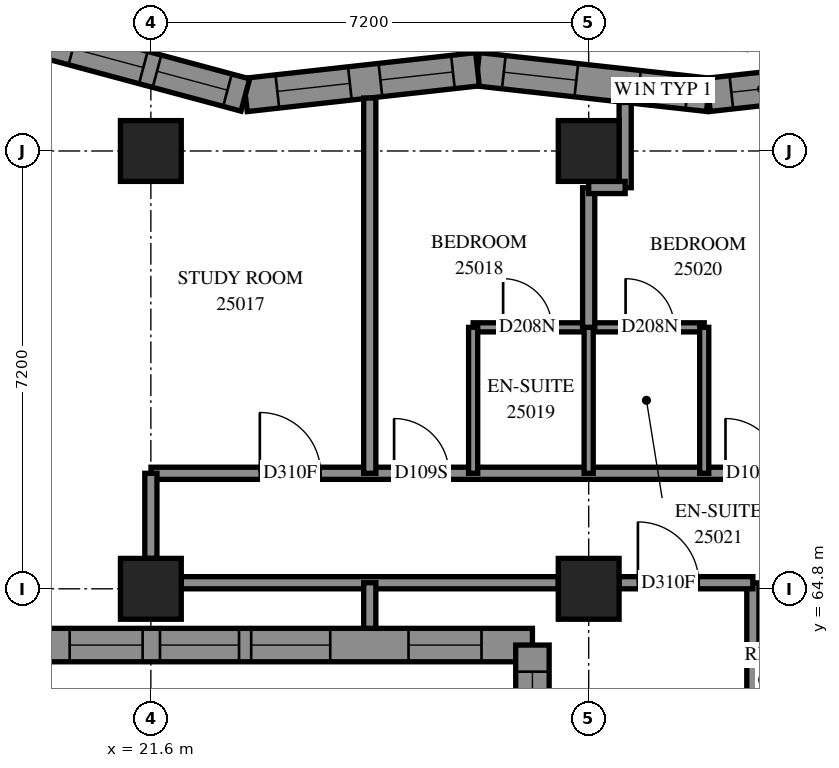
"""IFC4 building model, lengths in metres.
Left out: names, types, materials, properties, quantities, classifications, styles, units other than length and angle.
Written with IfcOpenShell. Run it as: python <this file> out.ifc"""

import sys

from ifc_helpers import new_model, si_unit, direction, frame, frame_2d, origin, origin_2d, place, context, subcontext, project, spatial, polyline, rectangle, outline, extrude, element, fill, save


model = new_model("IFC4")
c1 = context("Model", 3, precision=1e-05, world=origin(), true_north=direction((0.0, 1.0)))
c2 = subcontext(c1, "Body", "Model", "MODEL_VIEW")
j1 = project(units=[si_unit("LENGTHUNIT", "METRE"), si_unit("PLANEANGLEUNIT", "RADIAN")], contexts=[c1])
p1 = place(None, origin())
s1 = spatial("IfcSite", under=j1, at=p1, CompositionType="ELEMENT")
p2 = place(p1, origin())
s2 = spatial("IfcBuilding", under=s1, at=p2, CompositionType="ELEMENT")
p3 = place(p2, frame((0.0, 0.0, 94.8)))
s3 = spatial("IfcBuildingStorey", under=s2, at=p3, CompositionType="ELEMENT", Elevation=94.8)
for number, where, z_axis, x_axis in (
    (1, (21.6, 64.8, 0.0), (0.0, 0.0, 1.0), (1.0, 0.0, 0.0)),
    (2, (21.6, 72.0, 0.0), (0.0, 0.0, 1.0), (1.0, 0.0, 0.0)),
    (3, (28.8, 64.8, 0.0), (0.0, 0.0, 1.0), (1.0, 0.0, 0.0)),
    (4, (28.8, 72.0, 0.0), (0.0, 0.0, 1.0), (1.0, 0.0, 0.0)),
):
    element("IfcColumn", number, at=place(p3, frame(where, z_axis=z_axis, x_axis=x_axis)), inside=s3, PredefinedType="COLUMN", context=c2, shape_type="SweptSolid", body=[
        extrude(rectangle(XDim=1.0, YDim=1.0, at=origin_2d()), origin(), (0.0, 0.0, 1.0), 3.1),
    ])
p4 = place(p3, frame((34.564, 73.344, 0.0), z_axis=(0.0, 0.0, 1.0), x_axis=(-0.993907338, -0.1102188888, 0.0)))
e5 = element("IfcWall", 5, at=p4, inside=s3, PredefinedType="SOLIDWALL", context=c2, shape_type="SweptSolid", body=[
    extrude(outline(polyline([(-0.03, -0.275), (3.789, -0.275), (3.85, 0.275), (0.03, 0.275), (-0.03, -0.275)])), origin(), (0.0, 0.0, 1.0), 3.1),
])
p5 = place(p4, frame((0.604, 0.0, 0.5)))
e6 = element("IfcOpeningElement", 6, at=p5, cuts=e5, PredefinedType="OPENING", context=c2, shape_type="SweptSolid", body=[
    extrude(rectangle(XDim=1.2, YDim=2.45, at=frame_2d((0.6, 1.225))), frame((0.0, 0.285, 0.0), z_axis=(0.0, -1.0, 0.0), x_axis=(1.0, 0.0, 0.0)), (0.0, 0.0, 1.0), 0.57),
])
p6 = place(p4, frame((2.439, 0.0, 0.45)))
e7 = element("IfcOpeningElement", 7, at=p6, cuts=e5, PredefinedType="OPENING", context=c2, shape_type="SweptSolid", body=[
    extrude(rectangle(XDim=1.0, YDim=2.5, at=frame_2d((0.5, 1.25))), frame((0.0, 0.285, 0.0), z_axis=(0.0, -1.0, 0.0), x_axis=(1.0, 0.0, 0.0)), (0.0, 0.0, 1.0), 0.57),
])
p7 = place(p3, frame((30.768, 72.923, 0.0), z_axis=(0.0, 0.0, 1.0), x_axis=(-0.99390702, 0.1102217568, 0.0)))
e8 = element("IfcWall", 8, at=p7, inside=s3, PredefinedType="SOLIDWALL", context=c2, shape_type="SweptSolid", body=[
    extrude(outline(polyline([(0.03, -0.275), (3.85, -0.275), (3.789, 0.275), (-0.03, 0.275), (0.03, -0.275)])), origin(), (0.0, 0.0, 1.0), 3.1),
])
p8 = place(p7, frame((2.184, 0.0, 0.5)))
e9 = element("IfcOpeningElement", 9, at=p8, cuts=e8, PredefinedType="OPENING", context=c2, shape_type="SweptSolid", body=[
    extrude(rectangle(XDim=1.2, YDim=2.45, at=frame_2d((0.6, 1.225))), frame((0.0, 0.285, 0.0), z_axis=(0.0, -1.0, 0.0), x_axis=(1.0, 0.0, 0.0)), (0.0, 0.0, 1.0), 0.57),
])
p9 = place(p7, frame((0.348, 0.0, 0.45)))
e10 = element("IfcOpeningElement", 10, at=p9, cuts=e8, PredefinedType="OPENING", context=c2, shape_type="SweptSolid", body=[
    extrude(rectangle(XDim=0.8, YDim=2.5, at=frame_2d((0.4, 1.25))), frame((0.0, 0.285, 0.0), z_axis=(0.0, -1.0, 0.0), x_axis=(1.0, 0.0, 0.0)), (0.0, 0.0, 1.0), 0.57),
])
p10 = place(p3, frame((26.972, 73.344, 0.0), z_axis=(0.0, 0.0, 1.0), x_axis=(-0.9939087915, -0.1102057815, 0.0)))
e11 = element("IfcWall", 11, at=p10, inside=s3, PredefinedType="SOLIDWALL", context=c2, shape_type="SweptSolid", body=[
    extrude(outline(polyline([(-0.03, -0.275), (3.789, -0.275), (3.893, 0.275), (0.03, 0.275), (-0.03, -0.275)])), origin(), (0.0, 0.0, 1.0), 3.1),
])
p11 = place(p10, frame((0.406, 0.0, 0.5)))
e12 = element("IfcOpeningElement", 12, at=p11, cuts=e11, PredefinedType="OPENING", context=c2, shape_type="SweptSolid", body=[
    extrude(rectangle(XDim=1.2, YDim=2.45, at=frame_2d((0.6, 1.225))), frame((0.0, 0.285, 0.0), z_axis=(0.0, -1.0, 0.0), x_axis=(1.0, 0.0, 0.0)), (0.0, 0.0, 1.0), 0.57),
])
p12 = place(p10, frame((2.112, 0.0, 0.5)))
e13 = element("IfcOpeningElement", 13, at=p12, cuts=e11, PredefinedType="OPENING", context=c2, shape_type="SweptSolid", body=[
    extrude(rectangle(XDim=1.2, YDim=2.45, at=frame_2d((0.6, 1.225))), frame((0.0, 0.285, 0.0), z_axis=(0.0, -1.0, 0.0), x_axis=(1.0, 0.0, 0.0)), (0.0, 0.0, 1.0), 0.57),
])
p13 = place(p3, frame((23.154, 72.921, 0.0), z_axis=(0.0, 0.0, 1.0), x_axis=(-0.9656855195, 0.2597142227, 0.0)))
e14 = element("IfcWall", 14, at=p13, inside=s3, PredefinedType="SOLIDWALL", context=c2, shape_type="SweptSolid", body=[
    extrude(outline(polyline([(0.052, -0.275), (3.983, -0.275), (3.266, 0.275), (-0.052, 0.275), (0.052, -0.275)])), origin(), (0.0, 0.0, 1.0), 3.1),
])
p14 = place(p13, frame((0.305, 0.0, 0.5)))
e15 = element("IfcOpeningElement", 15, at=p14, cuts=e14, PredefinedType="OPENING", context=c2, shape_type="SweptSolid", body=[
    extrude(rectangle(XDim=1.2, YDim=2.45, at=frame_2d((0.6, 1.225))), frame((0.0, 0.285, 0.0), z_axis=(0.0, -1.0, 0.0), x_axis=(1.0, 0.0, 0.0)), (0.0, 0.0, 1.0), 0.57),
])
p15 = place(p13, frame((1.738, 0.0, 0.5)))
e16 = element("IfcOpeningElement", 16, at=p15, cuts=e14, PredefinedType="OPENING", context=c2, shape_type="SweptSolid", body=[
    extrude(rectangle(XDim=1.2, YDim=2.45, at=frame_2d((0.6, 1.225))), frame((0.0, 0.285, 0.0), z_axis=(0.0, -1.0, 0.0), x_axis=(1.0, 0.0, 0.0)), (0.0, 0.0, 1.0), 0.57),
])
p16 = place(p3, frame((19.654, 63.875, 0.0), z_axis=(0.0, 0.0, 1.0), x_axis=(1.0, 0.0, 0.0)))
e17 = element("IfcWall", 17, at=p16, inside=s3, PredefinedType="SOLIDWALL", context=c2, shape_type="SweptSolid", body=[
    extrude(outline(polyline([(-0.275, -0.275), (7.946, -0.275), (8.496, 0.275), (0.275, 0.275), (-0.275, -0.275)])), origin(), (0.0, 0.0, 1.0), 3.1),
])
p17 = place(p16, frame((2.096, 0.0, 0.5)))
e18 = element("IfcOpeningElement", 18, at=p17, cuts=e17, PredefinedType="OPENING", context=c2, shape_type="SweptSolid", body=[
    extrude(rectangle(XDim=1.3, YDim=2.45, at=frame_2d((0.65, 1.225))), frame((0.0, 0.285, 0.0), z_axis=(0.0, -1.0, 0.0), x_axis=(1.0, 0.0, 0.0)), (0.0, 0.0, 1.0), 0.57),
])
p18 = place(p16, frame((3.596, 0.0, 0.5)))
e19 = element("IfcOpeningElement", 19, at=p18, cuts=e17, PredefinedType="OPENING", context=c2, shape_type="SweptSolid", body=[
    extrude(rectangle(XDim=1.3, YDim=2.45, at=frame_2d((0.65, 1.225))), frame((0.0, 0.285, 0.0), z_axis=(0.0, -1.0, 0.0), x_axis=(1.0, 0.0, 0.0)), (0.0, 0.0, 1.0), 0.57),
])
p19 = place(p16, frame((0.611, 0.0, 0.5)))
e20 = element("IfcOpeningElement", 20, at=p19, cuts=e17, PredefinedType="OPENING", context=c2, shape_type="SweptSolid", body=[
    extrude(rectangle(XDim=1.2, YDim=2.45, at=frame_2d((0.6, 1.225))), frame((0.0, 0.285, 0.0), z_axis=(0.0, -1.0, 0.0), x_axis=(1.0, 0.0, 0.0)), (0.0, 0.0, 1.0), 0.57),
])
p20 = place(p16, frame((6.184, 0.0, 0.5)))
e21 = element("IfcOpeningElement", 21, at=p20, cuts=e17, PredefinedType="OPENING", context=c2, shape_type="SweptSolid", body=[
    extrude(rectangle(XDim=1.2, YDim=2.45, at=frame_2d((0.6, 1.225))), frame((0.0, 0.285, 0.0), z_axis=(0.0, -1.0, 0.0), x_axis=(1.0, 0.0, 0.0)), (0.0, 0.0, 1.0), 0.57),
])
p21 = place(p3, frame((27.875, 63.875, 0.0), z_axis=(0.0, 0.0, 1.0), x_axis=(0.0, -1.0, 0.0)))
e22 = element("IfcWall", 22, at=p21, inside=s3, PredefinedType="SOLIDWALL", context=c2, shape_type="SweptSolid", body=[
    extrude(outline(polyline([(0.275, -0.275), (8.496, -0.275), (7.946, 0.275), (-0.275, 0.275), (0.275, -0.275)])), origin(), (0.0, 0.0, 1.0), 3.1),
])
p22 = place(p21, frame((4.825, 0.0, 0.5)))
e23 = element("IfcOpeningElement", 23, at=p22, cuts=e22, PredefinedType="OPENING", context=c2, shape_type="SweptSolid", body=[
    extrude(rectangle(XDim=1.3, YDim=2.45, at=frame_2d((0.65, 1.225))), frame((0.0, 0.285, 0.0), z_axis=(0.0, -1.0, 0.0), x_axis=(1.0, 0.0, 0.0)), (0.0, 0.0, 1.0), 0.57),
])
p23 = place(p21, frame((0.438, 0.0, 0.5)))
e24 = element("IfcOpeningElement", 24, at=p23, cuts=e22, PredefinedType="OPENING", context=c2, shape_type="SweptSolid", body=[
    extrude(rectangle(XDim=1.2, YDim=2.45, at=frame_2d((0.6, 1.225))), frame((0.0, 0.285, 0.0), z_axis=(0.0, -1.0, 0.0), x_axis=(1.0, 0.0, 0.0)), (0.0, 0.0, 1.0), 0.57),
])
p24 = place(p21, frame((6.41, 0.0, 0.5)))
e25 = element("IfcOpeningElement", 25, at=p24, cuts=e22, PredefinedType="OPENING", context=c2, shape_type="SweptSolid", body=[
    extrude(rectangle(XDim=1.2, YDim=2.45, at=frame_2d((0.6, 1.225))), frame((0.0, 0.285, 0.0), z_axis=(0.0, -1.0, 0.0), x_axis=(1.0, 0.0, 0.0)), (0.0, 0.0, 1.0), 0.57),
])
p25 = place(p21, frame((1.931, 0.0, 0.5)))
e26 = element("IfcOpeningElement", 26, at=p25, cuts=e22, PredefinedType="OPENING", context=c2, shape_type="SweptSolid", body=[
    extrude(rectangle(XDim=1.3, YDim=2.45, at=frame_2d((0.65, 1.225))), frame((0.0, 0.285, 0.0), z_axis=(0.0, -1.0, 0.0), x_axis=(1.0, 0.0, 0.0)), (0.0, 0.0, 1.0), 0.57),
])
p26 = place(p21, frame((3.725, 0.0, 0.45)))
e27 = element("IfcOpeningElement", 27, at=p26, cuts=e22, PredefinedType="OPENING", context=c2, shape_type="SweptSolid", body=[
    extrude(rectangle(XDim=1.0, YDim=2.5, at=frame_2d((0.5, 1.25))), frame((0.0, 0.285, 0.0), z_axis=(0.0, -1.0, 0.0), x_axis=(1.0, 0.0, 0.0)), (0.0, 0.0, 1.0), 0.57),
])
p27 = place(p3, frame((21.602, 66.7, 0.0), z_axis=(0.0, 0.0, 1.0), x_axis=(1.0, 0.0, 0.0)))
e28 = element("IfcWall", 28, at=p27, inside=s3, PredefinedType="PARTITIONING", context=c2, shape_type="SweptSolid", body=[
    extrude(rectangle(XDim=11.698, YDim=0.2, at=frame_2d((5.849, 0.0))), origin(), (0.0, 0.0, 1.0), 3.1),
])
p28 = place(p27, frame((1.79, 0.0, 0.0)))
e29 = element("IfcOpeningElement", 29, at=p28, cuts=e28, PredefinedType="OPENING", context=c2, shape_type="SweptSolid", body=[
    extrude(rectangle(XDim=1.0, YDim=2.1, at=frame_2d((0.5, 1.05))), frame((0.0, 0.11, 0.0), z_axis=(0.0, -1.0, 0.0), x_axis=(1.0, 0.0, 0.0)), (0.0, 0.0, 1.0), 0.22),
])
p29 = place(p27, frame((3.998, 0.0, 0.0)))
e30 = element("IfcOpeningElement", 30, at=p29, cuts=e28, PredefinedType="OPENING", context=c2, shape_type="SweptSolid", body=[
    extrude(rectangle(XDim=0.9, YDim=2.1, at=frame_2d((0.45, 1.05))), frame((0.0, 0.11, 0.0), z_axis=(0.0, -1.0, 0.0), x_axis=(1.0, 0.0, 0.0)), (0.0, 0.0, 1.0), 0.22),
])
p30 = place(p27, frame((9.448, 0.0, 0.0)))
e31 = element("IfcOpeningElement", 31, at=p30, cuts=e28, PredefinedType="OPENING", context=c2, shape_type="SweptSolid", body=[
    extrude(rectangle(XDim=0.9, YDim=2.1, at=frame_2d((0.45, 1.05))), frame((0.0, 0.11, 0.0), z_axis=(0.0, -1.0, 0.0), x_axis=(1.0, 0.0, 0.0)), (0.0, 0.0, 1.0), 0.22),
])
p31 = place(p3, frame((22.1, 64.9, 0.0), z_axis=(0.0, 0.0, 1.0), x_axis=(1.0, 0.0, 0.0)))
e32 = element("IfcWall", 32, at=p31, inside=s3, PredefinedType="PARTITIONING", context=c2, shape_type="SweptSolid", body=[
    extrude(rectangle(XDim=6.2, YDim=0.2, at=frame_2d((3.1, 0.0))), origin(), (0.0, 0.0, 1.0), 2.6),
])
p32 = place(p3, frame((25.2, 66.7, 0.0), z_axis=(0.0, 0.0, 1.0), x_axis=(0.0, 1.0, 0.0)))
e33 = element("IfcWall", 33, at=p32, inside=s3, PredefinedType="PARTITIONING", context=c2, shape_type="SweptSolid", body=[
    extrude(rectangle(XDim=6.171, YDim=0.2, at=frame_2d((3.086, 0.0))), origin(), (0.0, 0.0, 1.0), 3.1),
])
p33 = place(p3, frame((26.9, 69.1, 0.0), z_axis=(0.0, 0.0, 1.0), x_axis=(1.0, 0.0, 0.0)))
e34 = element("IfcWall", 34, at=p33, inside=s3, PredefinedType="PARTITIONING", context=c2, shape_type="SweptSolid", body=[
    extrude(rectangle(XDim=3.8, YDim=0.15, at=frame_2d((1.9, 0.0))), origin(), (0.0, 0.0, 1.0), 3.1),
])
p34 = place(p33, frame((0.493, 0.0, 0.0)))
e35 = element("IfcOpeningElement", 35, at=p34, cuts=e34, PredefinedType="OPENING", context=c2, shape_type="SweptSolid", body=[
    extrude(rectangle(XDim=0.8, YDim=2.1, at=frame_2d((0.4, 1.05))), frame((0.0, 0.085, 0.0), z_axis=(0.0, -1.0, 0.0), x_axis=(1.0, 0.0, 0.0)), (0.0, 0.0, 1.0), 0.17),
])
p35 = place(p33, frame((2.507, 0.0, 0.0)))
e36 = element("IfcOpeningElement", 36, at=p35, cuts=e34, PredefinedType="OPENING", context=c2, shape_type="SweptSolid", body=[
    extrude(rectangle(XDim=0.8, YDim=2.1, at=frame_2d((0.4, 1.05))), frame((0.0, 0.085, 0.0), z_axis=(0.0, -1.0, 0.0), x_axis=(1.0, 0.0, 0.0)), (0.0, 0.0, 1.0), 0.17),
])
p36 = place(p3, frame((31.5, 62.102, 0.0), z_axis=(0.0, 0.0, 1.0), x_axis=(0.0, 1.0, 0.0)))
e37 = element("IfcWall", 37, at=p36, inside=s3, PredefinedType="PARTITIONING", context=c2, shape_type="SweptSolid", body=[
    extrude(rectangle(XDim=2.796, YDim=0.2, at=frame_2d((1.398, 0.0))), origin(), (0.0, 0.0, 1.0), 3.1),
])
for number, where, z_axis, x_axis in (
    (38, (26.9, 66.7, 0.0), (0.0, 0.0, 1.0), (0.0, 1.0, 0.0)),
    (39, (28.8, 66.7, 0.0), (0.0, 0.0, 1.0), (0.0, 1.0, 0.0)),
    (40, (30.7, 66.7, 0.0), (0.0, 0.0, 1.0), (0.0, 1.0, 0.0)),
):
    element("IfcWall", number, at=place(p3, frame(where, z_axis=z_axis, x_axis=x_axis)), inside=s3, PredefinedType="PARTITIONING", context=c2, shape_type="SweptSolid", body=[
        extrude(rectangle(XDim=2.4, YDim=0.15, at=frame_2d((1.2, 0.0))), origin(), (0.0, 0.0, 1.0), 3.1),
    ])
p37 = place(p3, frame((28.8, 69.1, 0.0), z_axis=(0.0, 0.0, 1.0), x_axis=(0.0, 1.0, 0.0)))
e41 = element("IfcWall", 41, at=p37, inside=s3, PredefinedType="PARTITIONING", context=c2, shape_type="SweptSolid", body=[
    extrude(rectangle(XDim=2.296, YDim=0.2, at=frame_2d((1.148, 0.0))), origin(), (0.0, 0.0, 1.0), 3.1),
])
p38 = place(p3, frame((29.3, 64.9, 0.0), z_axis=(0.0, 0.0, 1.0), x_axis=(1.0, 0.0, 0.0)))
e42 = element("IfcWall", 42, at=p38, inside=s3, PredefinedType="PARTITIONING", context=c2, shape_type="SweptSolid", body=[
    extrude(rectangle(XDim=2.2, YDim=0.2, at=frame_2d((1.1, 0.0))), origin(), (0.0, 0.0, 1.0), 3.1),
])
p39 = place(p38, frame((0.31, 0.0, 0.0)))
e43 = element("IfcOpeningElement", 43, at=p39, cuts=e42, PredefinedType="OPENING", context=c2, shape_type="SweptSolid", body=[
    extrude(rectangle(XDim=1.0, YDim=2.1, at=frame_2d((0.5, 1.05))), frame((0.0, 0.11, 0.0), z_axis=(0.0, -1.0, 0.0), x_axis=(1.0, 0.0, 0.0)), (0.0, 0.0, 1.0), 0.22),
])
p40 = place(p3, frame((21.6, 65.3, 0.0), z_axis=(0.0, 0.0, 1.0), x_axis=(0.0, 1.0, 0.0)))
e44 = element("IfcWall", 44, at=p40, inside=s3, PredefinedType="PARTITIONING", context=c2, shape_type="SweptSolid", body=[
    extrude(rectangle(XDim=1.4, YDim=0.2, at=frame_2d((0.7, 0.0))), origin(), (0.0, 0.0, 1.0), 2.6),
])
p41 = place(p3, frame((29.4, 71.396, 0.0), z_axis=(0.0, 0.0, 1.0), x_axis=(0.0, 1.0, 0.0)))
e45 = element("IfcWall", 45, at=p41, inside=s3, PredefinedType="PARTITIONING", context=c2, shape_type="SweptSolid", body=[
    extrude(rectangle(XDim=1.402, YDim=0.2, at=frame_2d((0.701, 0.0))), origin(), (0.0, 0.0, 1.0), 3.1),
])
p42 = place(p3, frame((25.2, 64.15, 0.0), z_axis=(0.0, 0.0, 1.0), x_axis=(0.0, 1.0, 0.0)))
e46 = element("IfcWall", 46, at=p42, inside=s3, PredefinedType="PARTITIONING", context=c2, shape_type="SweptSolid", body=[
    extrude(rectangle(XDim=0.75, YDim=0.2, at=frame_2d((0.375, 0.0))), origin(), (0.0, 0.0, 1.0), 3.1),
])
p43 = place(p3, frame((28.8, 71.4, 0.0), z_axis=(0.0, 0.0, 1.0), x_axis=(1.0, 0.0, 0.0)))
e47 = element("IfcWall", 47, at=p43, inside=s3, PredefinedType="PARTITIONING", context=c2, shape_type="SweptSolid", body=[
    extrude(rectangle(XDim=0.6, YDim=0.2, at=frame_2d((0.3, 0.0))), origin(), (0.0, 0.0, 1.0), 3.1),
])
p44 = place(p8, origin())
e48 = element("IfcWindow", 48, at=p44, inside=s3, PartitioningType="SINGLE_PANEL", PredefinedType="WINDOW", context=c2, shape_type="SweptSolid", body=[
    extrude(rectangle(XDim=1.2, YDim=2.45, at=frame_2d((0.6, 1.225))), frame((0.0, 0.155, 0.0), z_axis=(0.0, -1.0, 0.0), x_axis=(1.0, 0.0, 0.0)), (0.0, 0.0, 1.0), 0.06),
])
fill(e9, e48)
p45 = place(p11, origin())
e49 = element("IfcWindow", 49, at=p45, inside=s3, PartitioningType="SINGLE_PANEL", PredefinedType="WINDOW", context=c2, shape_type="SweptSolid", body=[
    extrude(rectangle(XDim=1.2, YDim=2.45, at=frame_2d((0.6, 1.225))), frame((0.0, 0.155, 0.0), z_axis=(0.0, -1.0, 0.0), x_axis=(1.0, 0.0, 0.0)), (0.0, 0.0, 1.0), 0.06),
])
fill(e12, e49)
p46 = place(p12, origin())
e50 = element("IfcWindow", 50, at=p46, inside=s3, PartitioningType="SINGLE_PANEL", PredefinedType="WINDOW", context=c2, shape_type="SweptSolid", body=[
    extrude(rectangle(XDim=1.2, YDim=2.45, at=frame_2d((0.6, 1.225))), frame((0.0, 0.155, 0.0), z_axis=(0.0, -1.0, 0.0), x_axis=(1.0, 0.0, 0.0)), (0.0, 0.0, 1.0), 0.06),
])
fill(e13, e50)
p47 = place(p14, origin())
e51 = element("IfcWindow", 51, at=p47, inside=s3, PartitioningType="SINGLE_PANEL", PredefinedType="WINDOW", context=c2, shape_type="SweptSolid", body=[
    extrude(rectangle(XDim=1.2, YDim=2.45, at=frame_2d((0.6, 1.225))), frame((0.0, 0.155, 0.0), z_axis=(0.0, -1.0, 0.0), x_axis=(1.0, 0.0, 0.0)), (0.0, 0.0, 1.0), 0.06),
])
fill(e15, e51)
p48 = place(p15, origin())
e52 = element("IfcWindow", 52, at=p48, inside=s3, PartitioningType="SINGLE_PANEL", PredefinedType="WINDOW", context=c2, shape_type="SweptSolid", body=[
    extrude(rectangle(XDim=1.2, YDim=2.45, at=frame_2d((0.6, 1.225))), frame((0.0, 0.155, 0.0), z_axis=(0.0, -1.0, 0.0), x_axis=(1.0, 0.0, 0.0)), (0.0, 0.0, 1.0), 0.06),
])
fill(e16, e52)
p49 = place(p17, origin())
e53 = element("IfcWindow", 53, at=p49, inside=s3, PartitioningType="SINGLE_PANEL", PredefinedType="WINDOW", context=c2, shape_type="SweptSolid", body=[
    extrude(rectangle(XDim=1.3, YDim=2.45, at=frame_2d((0.65, 1.225))), frame((0.0, 0.155, 0.0), z_axis=(0.0, -1.0, 0.0), x_axis=(1.0, 0.0, 0.0)), (0.0, 0.0, 1.0), 0.06),
])
fill(e18, e53)
p50 = place(p18, origin())
e54 = element("IfcWindow", 54, at=p50, inside=s3, PartitioningType="SINGLE_PANEL", PredefinedType="WINDOW", context=c2, shape_type="SweptSolid", body=[
    extrude(rectangle(XDim=1.3, YDim=2.45, at=frame_2d((0.65, 1.225))), frame((0.0, 0.155, 0.0), z_axis=(0.0, -1.0, 0.0), x_axis=(1.0, 0.0, 0.0)), (0.0, 0.0, 1.0), 0.06),
])
fill(e19, e54)
p51 = place(p19, origin())
e55 = element("IfcWindow", 55, at=p51, inside=s3, PartitioningType="SINGLE_PANEL", PredefinedType="WINDOW", context=c2, shape_type="SweptSolid", body=[
    extrude(rectangle(XDim=1.2, YDim=2.45, at=frame_2d((0.6, 1.225))), frame((0.0, 0.155, 0.0), z_axis=(0.0, -1.0, 0.0), x_axis=(1.0, 0.0, 0.0)), (0.0, 0.0, 1.0), 0.06),
])
fill(e20, e55)
p52 = place(p20, origin())
e56 = element("IfcWindow", 56, at=p52, inside=s3, PartitioningType="SINGLE_PANEL", PredefinedType="WINDOW", context=c2, shape_type="SweptSolid", body=[
    extrude(rectangle(XDim=1.2, YDim=2.45, at=frame_2d((0.6, 1.225))), frame((0.0, 0.155, 0.0), z_axis=(0.0, -1.0, 0.0), x_axis=(1.0, 0.0, 0.0)), (0.0, 0.0, 1.0), 0.06),
])
fill(e21, e56)
p53 = place(p23, origin())
e57 = element("IfcWindow", 57, at=p53, inside=s3, PartitioningType="SINGLE_PANEL", PredefinedType="WINDOW", context=c2, shape_type="SweptSolid", body=[
    extrude(rectangle(XDim=1.2, YDim=2.45, at=frame_2d((0.6, 1.225))), frame((0.0, 0.155, 0.0), z_axis=(0.0, -1.0, 0.0), x_axis=(1.0, 0.0, 0.0)), (0.0, 0.0, 1.0), 0.06),
])
fill(e24, e57)
p54 = place(p28, origin())
e58 = element("IfcDoor", 58, at=p54, inside=s3, OperationType="SINGLE_SWING_RIGHT", PredefinedType="DOOR", context=c2, shape_type="SweptSolid", body=[
    extrude(rectangle(XDim=1.0, YDim=2.1, at=frame_2d((0.5, 1.05))), frame((0.0, 0.025, 0.0), z_axis=(0.0, -1.0, 0.0), x_axis=(1.0, 0.0, 0.0)), (0.0, 0.0, 1.0), 0.05),
])
fill(e29, e58)
p55 = place(p29, origin())
e59 = element("IfcDoor", 59, at=p55, inside=s3, OperationType="SINGLE_SWING_LEFT", PredefinedType="DOOR", context=c2, shape_type="SweptSolid", body=[
    extrude(rectangle(XDim=0.9, YDim=2.1, at=frame_2d((0.45, 1.05))), frame((0.0, 0.025, 0.0), z_axis=(0.0, -1.0, 0.0), x_axis=(1.0, 0.0, 0.0)), (0.0, 0.0, 1.0), 0.05),
])
fill(e30, e59)
p56 = place(p34, origin())
e60 = element("IfcDoor", 60, at=p56, inside=s3, OperationType="SINGLE_SWING_RIGHT", PredefinedType="DOOR", context=c2, shape_type="SweptSolid", body=[
    extrude(rectangle(XDim=0.8, YDim=2.1, at=frame_2d((0.4, 1.05))), frame((0.0, 0.025, 0.0), z_axis=(0.0, -1.0, 0.0), x_axis=(1.0, 0.0, 0.0)), (0.0, 0.0, 1.0), 0.05),
])
fill(e35, e60)
p57 = place(p30, origin())
e61 = element("IfcDoor", 61, at=p57, inside=s3, OperationType="SINGLE_SWING_RIGHT", PredefinedType="DOOR", context=c2, shape_type="SweptSolid", body=[
    extrude(rectangle(XDim=0.9, YDim=2.1, at=frame_2d((0.45, 1.05))), frame((0.0, 0.025, 0.0), z_axis=(0.0, -1.0, 0.0), x_axis=(1.0, 0.0, 0.0)), (0.0, 0.0, 1.0), 0.05),
])
fill(e31, e61)
p58 = place(p35, origin())
e62 = element("IfcDoor", 62, at=p58, inside=s3, OperationType="SINGLE_SWING_RIGHT", PredefinedType="DOOR", context=c2, shape_type="SweptSolid", body=[
    extrude(rectangle(XDim=0.8, YDim=2.1, at=frame_2d((0.4, 1.05))), frame((0.0, 0.025, 0.0), z_axis=(0.0, -1.0, 0.0), x_axis=(1.0, 0.0, 0.0)), (0.0, 0.0, 1.0), 0.05),
])
fill(e36, e62)
p59 = place(p39, origin())
e63 = element("IfcDoor", 63, at=p59, inside=s3, OperationType="SINGLE_SWING_RIGHT", PredefinedType="DOOR", context=c2, shape_type="SweptSolid", body=[
    extrude(rectangle(XDim=1.0, YDim=2.1, at=frame_2d((0.5, 1.05))), frame((0.0, 0.025, 0.0), z_axis=(0.0, -1.0, 0.0), x_axis=(1.0, 0.0, 0.0)), (0.0, 0.0, 1.0), 0.05),
])
fill(e43, e63)
p60 = place(p6, origin())
e64 = element("IfcWindow", 64, at=p60, inside=s3, PartitioningType="SINGLE_PANEL", PredefinedType="WINDOW", context=c2, shape_type="SweptSolid", body=[
    extrude(rectangle(XDim=1.0, YDim=2.5, at=frame_2d((0.5, 1.25))), frame((0.0, 0.155, 0.0), z_axis=(0.0, -1.0, 0.0), x_axis=(1.0, 0.0, 0.0)), (0.0, 0.0, 1.0), 0.06),
])
fill(e7, e64)
p61 = place(p9, origin())
e65 = element("IfcWindow", 65, at=p61, inside=s3, PartitioningType="SINGLE_PANEL", PredefinedType="WINDOW", context=c2, shape_type="SweptSolid", body=[
    extrude(rectangle(XDim=0.8, YDim=2.5, at=frame_2d((0.4, 1.25))), frame((0.0, 0.155, 0.0), z_axis=(0.0, -1.0, 0.0), x_axis=(1.0, 0.0, 0.0)), (0.0, 0.0, 1.0), 0.06),
])
fill(e10, e65)
save(model, sys.argv[1])
